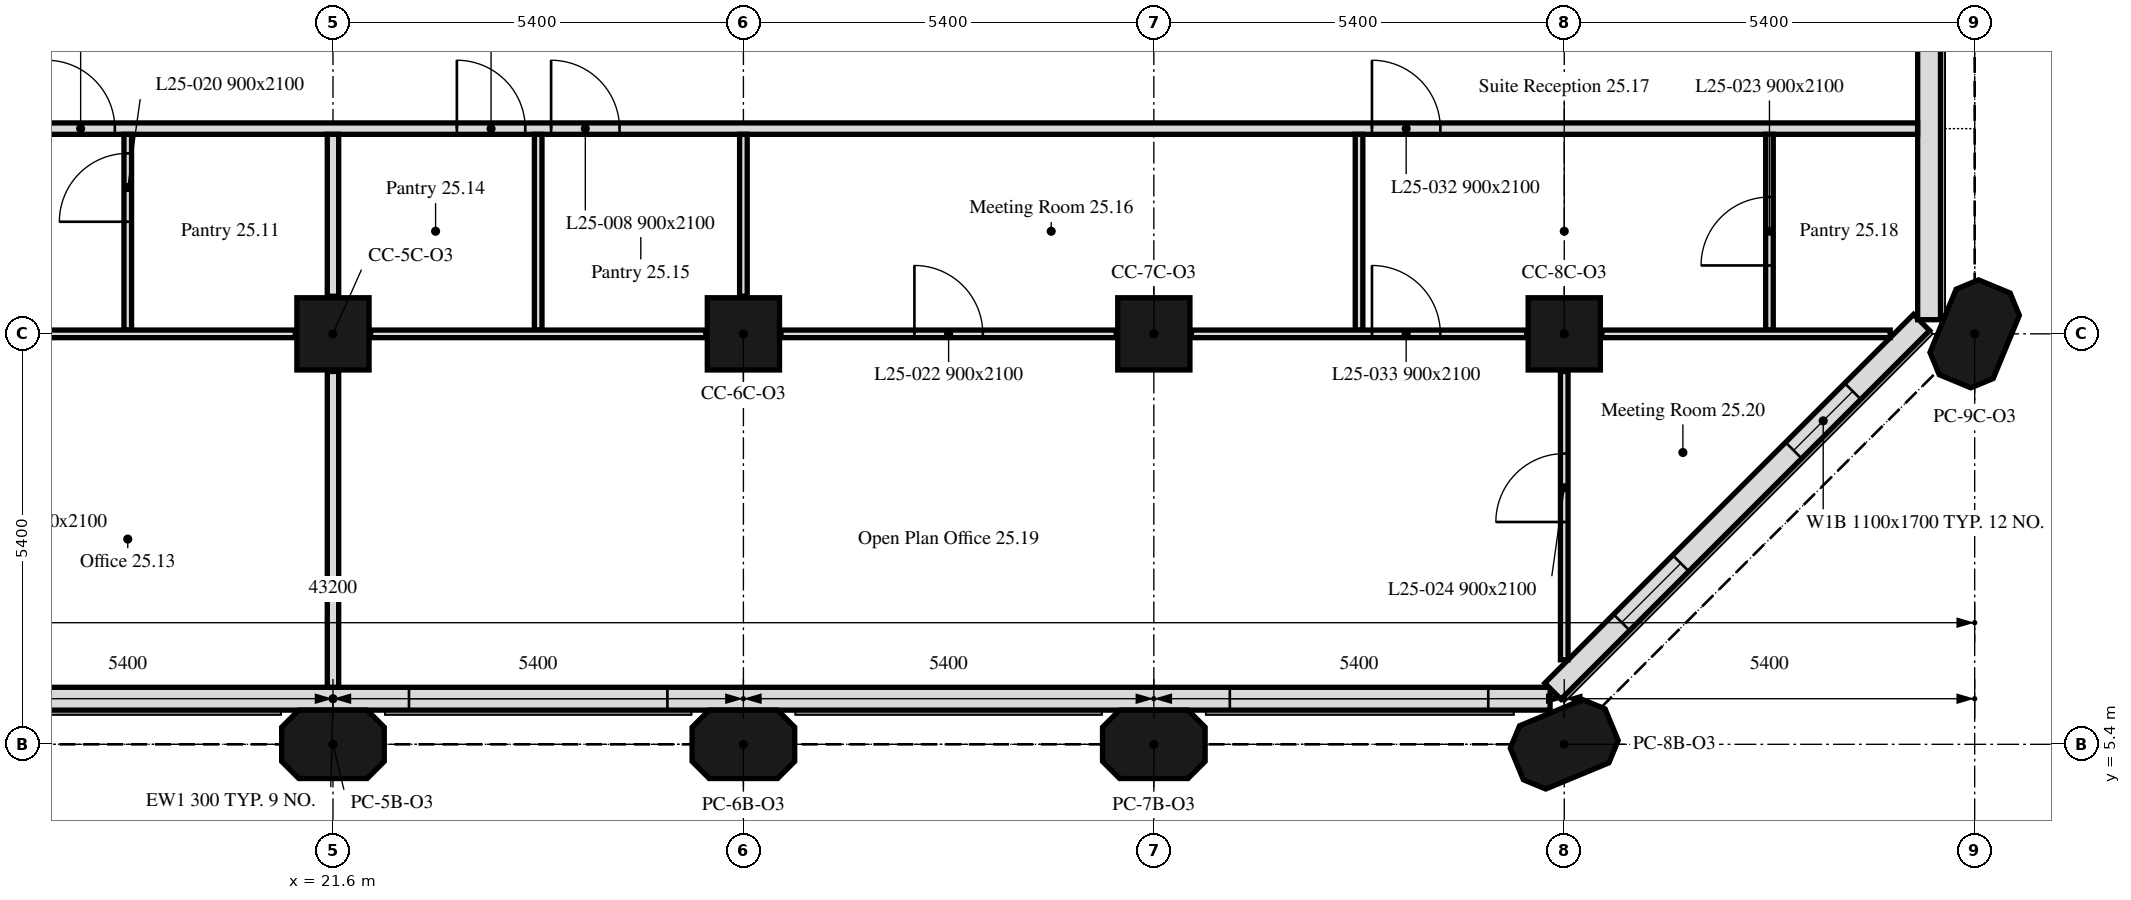
"""IFC4 building model, lengths in metres.
Left out: names, types, materials, properties, quantities, classifications, styles, units other than length and angle.
Written with IfcOpenShell. Run it as: python <this file> out.ifc"""

import sys

from ifc_helpers import new_model, si_unit, direction, frame, frame_2d, origin, origin_2d, place, context, subcontext, project, spatial, polyline, rectangle, outline, extrude, element, fill, save


model = new_model("IFC4")
c1 = context("Model", 3, precision=1e-05, world=origin(), true_north=direction((0.0, 1.0)))
c2 = subcontext(c1, "Body", "Model", "MODEL_VIEW")
j1 = project(units=[si_unit("LENGTHUNIT", "METRE"), si_unit("PLANEANGLEUNIT", "RADIAN")], contexts=[c1])
p1 = place(None, origin())
s1 = spatial("IfcSite", under=j1, at=p1, CompositionType="ELEMENT")
p2 = place(p1, origin())
s2 = spatial("IfcBuilding", under=s1, at=p2, CompositionType="ELEMENT")
p3 = place(p2, frame((0.0, 0.0, 106.8)))
s3 = spatial("IfcBuildingStorey", under=s2, at=p3, CompositionType="ELEMENT", Elevation=106.8)
for number, where, z_axis, x_axis in (
    (1, (21.6, 5.4, 0.0), (0.0, 0.0, 1.0), (1.0, 0.0, 0.0)),
    (2, (27.0, 5.4, 0.0), (0.0, 0.0, 1.0), (1.0, 0.0, 0.0)),
    (3, (32.4, 5.4, 0.0), (0.0, 0.0, 1.0), (1.0, 0.0, 0.0)),
    (4, (37.8, 5.4, 0.0), (0.0, 0.0, 1.0), (0.924, 0.383, 0.0)),
):
    element("IfcColumn", number, at=place(p3, frame(where, z_axis=z_axis, x_axis=x_axis)), inside=s3, PredefinedType="COLUMN", context=c2, shape_type="SweptSolid", body=[
        extrude(outline(polyline([(-0.45, -0.45), (0.45, -0.45), (0.675, -0.225), (0.675, 0.225), (0.45, 0.45), (-0.45, 0.45), (-0.675, 0.225), (-0.675, -0.225), (-0.45, -0.45)])), origin(), (0.0, 0.0, 1.0), 3.5),
    ])
for number, where, z_axis, x_axis in (
    (5, (21.6, 10.8, 0.0), (0.0, 0.0, 1.0), (1.0, 0.0, 0.0)),
    (6, (27.0, 10.8, 0.0), (0.0, 0.0, 1.0), (1.0, 0.0, 0.0)),
    (7, (32.4, 10.8, 0.0), (0.0, 0.0, 1.0), (1.0, 0.0, 0.0)),
    (8, (37.8, 10.8, 0.0), (0.0, 0.0, 1.0), (1.0, 0.0, 0.0)),
):
    element("IfcColumn", number, at=place(p3, frame(where, z_axis=z_axis, x_axis=x_axis)), inside=s3, PredefinedType="COLUMN", context=c2, shape_type="SweptSolid", body=[
        extrude(rectangle(XDim=0.95, YDim=0.95, at=origin_2d()), origin(), (0.0, 0.0, 1.0), 3.5),
    ])
p4 = place(p3, frame((43.2, 10.8, 0.0), z_axis=(0.0, 0.0, 1.0), x_axis=(0.382683432365, 0.923879532511, 0.0)))
e9 = element("IfcColumn", 9, at=p4, inside=s3, PredefinedType="COLUMN", context=c2, shape_type="SweptSolid", body=[
    extrude(outline(polyline([(-0.45, -0.45), (0.45, -0.45), (0.675, -0.225), (0.675, 0.225), (0.45, 0.45), (-0.45, 0.45), (-0.675, 0.225), (-0.675, -0.225), (-0.45, -0.45)])), origin(), (0.0, 0.0, 1.0), 3.5),
])
p5 = place(p3, frame((5.586, 6.0, 0.0), z_axis=(0.0, 0.0, 1.0), x_axis=(1.0, 0.0, 0.0)))
e10 = element("IfcWall", 10, at=p5, inside=s3, PredefinedType="SOLIDWALL", context=c2, shape_type="SweptSolid", body=[
    extrude(rectangle(XDim=32.027, YDim=0.3, at=frame_2d((16.014, 0.0))), origin(), (0.0, 0.0, 1.0), 3.5),
])
p6 = place(p5, frame((6.214, 0.0, 0.9)))
e11 = element("IfcOpeningElement", 11, at=p6, cuts=e10, PredefinedType="OPENING", context=c2, shape_type="SweptSolid", body=[
    extrude(rectangle(XDim=3.4, YDim=1.7, at=frame_2d((1.7, 0.85))), frame((0.0, 0.16, 0.0), z_axis=(0.0, -1.0, 0.0), x_axis=(1.0, 0.0, 0.0)), (0.0, 0.0, 1.0), 0.32),
])
p7 = place(p5, frame((17.014, 0.0, 0.9)))
e12 = element("IfcOpeningElement", 12, at=p7, cuts=e10, PredefinedType="OPENING", context=c2, shape_type="SweptSolid", body=[
    extrude(rectangle(XDim=3.4, YDim=1.7, at=frame_2d((1.7, 0.85))), frame((0.0, 0.16, 0.0), z_axis=(0.0, -1.0, 0.0), x_axis=(1.0, 0.0, 0.0)), (0.0, 0.0, 1.0), 0.32),
])
p8 = place(p5, frame((27.814, 0.0, 0.9)))
e13 = element("IfcOpeningElement", 13, at=p8, cuts=e10, PredefinedType="OPENING", context=c2, shape_type="SweptSolid", body=[
    extrude(rectangle(XDim=3.4, YDim=1.7, at=frame_2d((1.7, 0.85))), frame((0.0, 0.16, 0.0), z_axis=(0.0, -1.0, 0.0), x_axis=(1.0, 0.0, 0.0)), (0.0, 0.0, 1.0), 0.32),
])
p9 = place(p3, frame((37.65, 6.099, 0.0), z_axis=(0.0, 0.0, 1.0), x_axis=(0.707106781187, 0.707106781187, 0.0)))
e14 = element("IfcWall", 14, at=p9, inside=s3, PredefinedType="SOLIDWALL", context=c2, shape_type="SweptSolid", body=[
    extrude(rectangle(XDim=6.86, YDim=0.3, at=frame_2d((3.43, 0.0))), origin(), (0.0, 0.0, 1.0), 3.5),
])
p10 = place(p9, frame((1.28, 0.0, 0.9)))
e15 = element("IfcOpeningElement", 15, at=p10, cuts=e14, PredefinedType="OPENING", context=c2, shape_type="SweptSolid", body=[
    extrude(rectangle(XDim=1.1, YDim=1.7, at=frame_2d((0.55, 0.85))), frame((0.0, 0.16, 0.0), z_axis=(0.0, -1.0, 0.0), x_axis=(1.0, 0.0, 0.0)), (0.0, 0.0, 1.0), 0.32),
])
p11 = place(p9, frame((4.48, 0.0, 0.9)))
e16 = element("IfcOpeningElement", 16, at=p11, cuts=e14, PredefinedType="OPENING", context=c2, shape_type="SweptSolid", body=[
    extrude(rectangle(XDim=1.1, YDim=1.7, at=frame_2d((0.55, 0.85))), frame((0.0, 0.16, 0.0), z_axis=(0.0, -1.0, 0.0), x_axis=(1.0, 0.0, 0.0)), (0.0, 0.0, 1.0), 0.32),
])
p12 = place(p3, frame((42.6, 10.986, 0.0), z_axis=(0.0, 0.0, 1.0), x_axis=(0.0, 1.0, 0.0)))
e17 = element("IfcWall", 17, at=p12, inside=s3, PredefinedType="SOLIDWALL", context=c2, shape_type="SweptSolid", body=[
    extrude(rectangle(XDim=5.214, YDim=0.3, at=frame_2d((2.607, 0.0))), origin(), (0.0, 0.0, 1.0), 3.5),
])
p13 = place(p3, frame((0.751, 13.5, 0.0), z_axis=(0.0, 0.0, 1.0), x_axis=(1.0, 0.0, 0.0)))
e18 = element("IfcWall", 18, at=p13, inside=s3, PredefinedType="PARTITIONING", context=c2, shape_type="SweptSolid", body=[
    extrude(rectangle(XDim=41.698, YDim=0.15, at=frame_2d((20.849, 0.0))), origin(), (0.0, 0.0, 1.0), 3.5),
])
p14 = place(p13, frame((6.279, 0.0, 0.0)))
e19 = element("IfcOpeningElement", 19, at=p14, cuts=e18, PredefinedType="OPENING", context=c2, shape_type="SweptSolid", body=[
    extrude(rectangle(XDim=0.9, YDim=2.1, at=frame_2d((0.45, 1.05))), frame((0.0, 0.075, 0.0), z_axis=(0.0, -1.0, 0.0), x_axis=(1.0, 0.0, 0.0)), (0.0, 0.0, 1.0), 0.15),
])
p15 = place(p13, frame((7.519, 0.0, 0.0)))
e20 = element("IfcOpeningElement", 20, at=p15, cuts=e18, PredefinedType="OPENING", context=c2, shape_type="SweptSolid", body=[
    extrude(rectangle(XDim=0.9, YDim=2.1, at=frame_2d((0.45, 1.05))), frame((0.0, 0.075, 0.0), z_axis=(0.0, -1.0, 0.0), x_axis=(1.0, 0.0, 0.0)), (0.0, 0.0, 1.0), 0.15),
])
p16 = place(p13, frame((11.679, 0.0, 0.0)))
e21 = element("IfcOpeningElement", 21, at=p16, cuts=e18, PredefinedType="OPENING", context=c2, shape_type="SweptSolid", body=[
    extrude(rectangle(XDim=0.9, YDim=2.1, at=frame_2d((0.45, 1.05))), frame((0.0, 0.075, 0.0), z_axis=(0.0, -1.0, 0.0), x_axis=(1.0, 0.0, 0.0)), (0.0, 0.0, 1.0), 0.15),
])
p17 = place(p13, frame((22.479, 0.0, 0.0)))
e22 = element("IfcOpeningElement", 22, at=p17, cuts=e18, PredefinedType="OPENING", context=c2, shape_type="SweptSolid", body=[
    extrude(rectangle(XDim=0.9, YDim=2.1, at=frame_2d((0.45, 1.05))), frame((0.0, 0.075, 0.0), z_axis=(0.0, -1.0, 0.0), x_axis=(1.0, 0.0, 0.0)), (0.0, 0.0, 1.0), 0.15),
])
p18 = place(p13, frame((23.719, 0.0, 0.0)))
e23 = element("IfcOpeningElement", 23, at=p18, cuts=e18, PredefinedType="OPENING", context=c2, shape_type="SweptSolid", body=[
    extrude(rectangle(XDim=0.9, YDim=2.1, at=frame_2d((0.45, 1.05))), frame((0.0, 0.075, 0.0), z_axis=(0.0, -1.0, 0.0), x_axis=(1.0, 0.0, 0.0)), (0.0, 0.0, 1.0), 0.15),
])
p19 = place(p13, frame((2.174, 0.0, 0.0)))
e24 = element("IfcOpeningElement", 24, at=p19, cuts=e18, PredefinedType="OPENING", context=c2, shape_type="SweptSolid", body=[
    extrude(rectangle(XDim=0.9, YDim=2.1, at=frame_2d((0.45, 1.05))), frame((0.0, 0.075, 0.0), z_axis=(0.0, -1.0, 0.0), x_axis=(1.0, 0.0, 0.0)), (0.0, 0.0, 1.0), 0.15),
])
p20 = place(p13, frame((17.079, 0.0, 0.0)))
e25 = element("IfcOpeningElement", 25, at=p20, cuts=e18, PredefinedType="OPENING", context=c2, shape_type="SweptSolid", body=[
    extrude(rectangle(XDim=0.9, YDim=2.1, at=frame_2d((0.45, 1.05))), frame((0.0, 0.075, 0.0), z_axis=(0.0, -1.0, 0.0), x_axis=(1.0, 0.0, 0.0)), (0.0, 0.0, 1.0), 0.15),
])
p21 = place(p13, frame((34.519, 0.0, 0.0)))
e26 = element("IfcOpeningElement", 26, at=p21, cuts=e18, PredefinedType="OPENING", context=c2, shape_type="SweptSolid", body=[
    extrude(rectangle(XDim=0.9, YDim=2.1, at=frame_2d((0.45, 1.05))), frame((0.0, 0.075, 0.0), z_axis=(0.0, -1.0, 0.0), x_axis=(1.0, 0.0, 0.0)), (0.0, 0.0, 1.0), 0.15),
])
p22 = place(p3, frame((18.9, 10.85, 0.0), z_axis=(0.0, 0.0, 1.0), x_axis=(0.0, 1.0, 0.0)))
e27 = element("IfcWall", 27, at=p22, inside=s3, PredefinedType="PARTITIONING", context=c2, shape_type="SweptSolid", body=[
    extrude(rectangle(XDim=2.575, YDim=0.1, at=frame_2d((1.288, 0.0))), origin(), (0.0, 0.0, 1.0), 3.5),
])
p23 = place(p22, frame((1.425, 0.0, 0.0)))
e28 = element("IfcOpeningElement", 28, at=p23, cuts=e27, PredefinedType="OPENING", context=c2, shape_type="SweptSolid", body=[
    extrude(rectangle(XDim=0.9, YDim=2.1, at=frame_2d((0.45, 1.05))), frame((0.0, 0.05, 0.0), z_axis=(0.0, -1.0, 0.0), x_axis=(1.0, 0.0, 0.0)), (0.0, 0.0, 1.0), 0.1),
])
p24 = place(p3, frame((16.695, 10.8, 0.0), z_axis=(0.0, 0.0, 1.0), x_axis=(1.0, 0.0, 0.0)))
e29 = element("IfcWall", 29, at=p24, inside=s3, PredefinedType="PARTITIONING", context=c2, shape_type="SweptSolid", body=[
    extrude(rectangle(XDim=4.41, YDim=0.1, at=frame_2d((2.205, 0.0))), origin(), (0.0, 0.0, 1.0), 3.5),
])
p25 = place(p3, frame((21.6, 11.295, 0.0), z_axis=(0.0, 0.0, 1.0), x_axis=(0.0, 1.0, 0.0)))
e30 = element("IfcWall", 30, at=p25, inside=s3, PredefinedType="PARTITIONING", context=c2, shape_type="SweptSolid", body=[
    extrude(rectangle(XDim=2.13, YDim=0.15, at=frame_2d((1.065, 0.0))), origin(), (0.0, 0.0, 1.0), 3.5),
])
p26 = place(p3, frame((21.6, 6.151, 0.0), z_axis=(0.0, 0.0, 1.0), x_axis=(0.0, 1.0, 0.0)))
e31 = element("IfcWall", 31, at=p26, inside=s3, PredefinedType="PARTITIONING", context=c2, shape_type="SweptSolid", body=[
    extrude(rectangle(XDim=4.154, YDim=0.15, at=frame_2d((2.077, 0.0))), origin(), (0.0, 0.0, 1.0), 3.5),
])
p27 = place(p3, frame((24.3, 10.85, 0.0), z_axis=(0.0, 0.0, 1.0), x_axis=(0.0, 1.0, 0.0)))
e32 = element("IfcWall", 32, at=p27, inside=s3, PredefinedType="PARTITIONING", context=c2, shape_type="SweptSolid", body=[
    extrude(rectangle(XDim=2.575, YDim=0.1, at=frame_2d((1.288, 0.0))), origin(), (0.0, 0.0, 1.0), 3.5),
])
p28 = place(p3, frame((22.095, 10.8, 0.0), z_axis=(0.0, 0.0, 1.0), x_axis=(1.0, 0.0, 0.0)))
e33 = element("IfcWall", 33, at=p28, inside=s3, PredefinedType="PARTITIONING", context=c2, shape_type="SweptSolid", body=[
    extrude(rectangle(XDim=4.41, YDim=0.1, at=frame_2d((2.205, 0.0))), origin(), (0.0, 0.0, 1.0), 3.5),
])
p29 = place(p3, frame((27.0, 11.295, 0.0), z_axis=(0.0, 0.0, 1.0), x_axis=(0.0, 1.0, 0.0)))
e34 = element("IfcWall", 34, at=p29, inside=s3, PredefinedType="PARTITIONING", context=c2, shape_type="SweptSolid", body=[
    extrude(rectangle(XDim=2.13, YDim=0.1, at=frame_2d((1.065, 0.0))), origin(), (0.0, 0.0, 1.0), 3.5),
])
p30 = place(p3, frame((27.495, 10.8, 0.0), z_axis=(0.0, 0.0, 1.0), x_axis=(1.0, 0.0, 0.0)))
e35 = element("IfcWall", 35, at=p30, inside=s3, PredefinedType="PARTITIONING", context=c2, shape_type="SweptSolid", body=[
    extrude(rectangle(XDim=4.41, YDim=0.1, at=frame_2d((2.205, 0.0))), origin(), (0.0, 0.0, 1.0), 3.5),
])
p31 = place(p30, frame((1.755, 0.0, 0.0)))
e36 = element("IfcOpeningElement", 36, at=p31, cuts=e35, PredefinedType="OPENING", context=c2, shape_type="SweptSolid", body=[
    extrude(rectangle(XDim=0.9, YDim=2.1, at=frame_2d((0.45, 1.05))), frame((0.0, 0.05, 0.0), z_axis=(0.0, -1.0, 0.0), x_axis=(1.0, 0.0, 0.0)), (0.0, 0.0, 1.0), 0.1),
])
p32 = place(p3, frame((35.1, 10.85, 0.0), z_axis=(0.0, 0.0, 1.0), x_axis=(0.0, 1.0, 0.0)))
e37 = element("IfcWall", 37, at=p32, inside=s3, PredefinedType="PARTITIONING", context=c2, shape_type="SweptSolid", body=[
    extrude(rectangle(XDim=2.575, YDim=0.1, at=frame_2d((1.288, 0.0))), origin(), (0.0, 0.0, 1.0), 3.5),
])
p33 = place(p3, frame((32.895, 10.8, 0.0), z_axis=(0.0, 0.0, 1.0), x_axis=(1.0, 0.0, 0.0)))
e38 = element("IfcWall", 38, at=p33, inside=s3, PredefinedType="PARTITIONING", context=c2, shape_type="SweptSolid", body=[
    extrude(rectangle(XDim=4.41, YDim=0.1, at=frame_2d((2.205, 0.0))), origin(), (0.0, 0.0, 1.0), 3.5),
])
p34 = place(p33, frame((2.375, 0.0, 0.0)))
e39 = element("IfcOpeningElement", 39, at=p34, cuts=e38, PredefinedType="OPENING", context=c2, shape_type="SweptSolid", body=[
    extrude(rectangle(XDim=0.9, YDim=2.1, at=frame_2d((0.45, 1.05))), frame((0.0, 0.05, 0.0), z_axis=(0.0, -1.0, 0.0), x_axis=(1.0, 0.0, 0.0)), (0.0, 0.0, 1.0), 0.1),
])
p35 = place(p3, frame((40.5, 10.85, 0.0), z_axis=(0.0, 0.0, 1.0), x_axis=(0.0, 1.0, 0.0)))
e40 = element("IfcWall", 40, at=p35, inside=s3, PredefinedType="PARTITIONING", context=c2, shape_type="SweptSolid", body=[
    extrude(rectangle(XDim=2.575, YDim=0.1, at=frame_2d((1.288, 0.0))), origin(), (0.0, 0.0, 1.0), 3.5),
])
p36 = place(p35, frame((0.85, 0.0, 0.0)))
e41 = element("IfcOpeningElement", 41, at=p36, cuts=e40, PredefinedType="OPENING", context=c2, shape_type="SweptSolid", body=[
    extrude(rectangle(XDim=0.9, YDim=2.1, at=frame_2d((0.45, 1.05))), frame((0.0, 0.05, 0.0), z_axis=(0.0, -1.0, 0.0), x_axis=(1.0, 0.0, 0.0)), (0.0, 0.0, 1.0), 0.1),
])
p37 = place(p3, frame((38.295, 10.8, 0.0), z_axis=(0.0, 0.0, 1.0), x_axis=(1.0, 0.0, 0.0)))
e42 = element("IfcWall", 42, at=p37, inside=s3, PredefinedType="PARTITIONING", context=c2, shape_type="SweptSolid", body=[
    extrude(rectangle(XDim=3.793, YDim=0.1, at=frame_2d((1.896, 0.0))), origin(), (0.0, 0.0, 1.0), 3.5),
])
p38 = place(p3, frame((37.8, 6.512, 0.0), z_axis=(0.0, 0.0, 1.0), x_axis=(0.0, 1.0, 0.0)))
e43 = element("IfcWall", 43, at=p38, inside=s3, PredefinedType="PARTITIONING", context=c2, shape_type="SweptSolid", body=[
    extrude(rectangle(XDim=3.793, YDim=0.1, at=frame_2d((1.896, 0.0))), origin(), (0.0, 0.0, 1.0), 3.5),
])
p39 = place(p38, frame((1.813, 0.0, 0.0)))
e44 = element("IfcOpeningElement", 44, at=p39, cuts=e43, PredefinedType="OPENING", context=c2, shape_type="SweptSolid", body=[
    extrude(rectangle(XDim=0.9, YDim=2.1, at=frame_2d((0.45, 1.05))), frame((0.0, 0.05, 0.0), z_axis=(0.0, -1.0, 0.0), x_axis=(1.0, 0.0, 0.0)), (0.0, 0.0, 1.0), 0.1),
])
p40 = place(p7, origin())
e45 = element("IfcWindow", 45, at=p40, inside=s3, PartitioningType="SINGLE_PANEL", PredefinedType="WINDOW", context=c2, shape_type="SweptSolid", body=[
    extrude(rectangle(XDim=3.4, YDim=1.7, at=frame_2d((1.7, 0.85))), frame((0.0, 0.03, 0.0), z_axis=(0.0, -1.0, 0.0), x_axis=(1.0, 0.0, 0.0)), (0.0, 0.0, 1.0), 0.06),
])
fill(e12, e45)
p41 = place(p8, origin())
e46 = element("IfcWindow", 46, at=p41, inside=s3, PartitioningType="SINGLE_PANEL", PredefinedType="WINDOW", context=c2, shape_type="SweptSolid", body=[
    extrude(rectangle(XDim=3.4, YDim=1.7, at=frame_2d((1.7, 0.85))), frame((0.0, 0.03, 0.0), z_axis=(0.0, -1.0, 0.0), x_axis=(1.0, 0.0, 0.0)), (0.0, 0.0, 1.0), 0.06),
])
fill(e13, e46)
p42 = place(p10, origin())
e47 = element("IfcWindow", 47, at=p42, inside=s3, PartitioningType="SINGLE_PANEL", PredefinedType="WINDOW", context=c2, shape_type="SweptSolid", body=[
    extrude(rectangle(XDim=1.1, YDim=1.7, at=frame_2d((0.55, 0.85))), frame((0.0, 0.03, 0.0), z_axis=(0.0, -1.0, 0.0), x_axis=(1.0, 0.0, 0.0)), (0.0, 0.0, 1.0), 0.06),
])
fill(e15, e47)
p43 = place(p11, origin())
e48 = element("IfcWindow", 48, at=p43, inside=s3, PartitioningType="SINGLE_PANEL", PredefinedType="WINDOW", context=c2, shape_type="SweptSolid", body=[
    extrude(rectangle(XDim=1.1, YDim=1.7, at=frame_2d((0.55, 0.85))), frame((0.0, 0.03, 0.0), z_axis=(0.0, -1.0, 0.0), x_axis=(1.0, 0.0, 0.0)), (0.0, 0.0, 1.0), 0.06),
])
fill(e16, e48)
p44 = place(p17, origin())
e49 = element("IfcDoor", 49, at=p44, inside=s3, OperationType="SINGLE_SWING_LEFT", PredefinedType="DOOR", context=c2, shape_type="SweptSolid", body=[
    extrude(rectangle(XDim=0.9, YDim=2.1, at=frame_2d((0.45, 1.05))), frame((0.0, 0.025, 0.0), z_axis=(0.0, -1.0, 0.0), x_axis=(1.0, 0.0, 0.0)), (0.0, 0.0, 1.0), 0.05),
])
fill(e22, e49)
p45 = place(p18, origin())
e50 = element("IfcDoor", 50, at=p45, inside=s3, OperationType="SINGLE_SWING_LEFT", PredefinedType="DOOR", context=c2, shape_type="SweptSolid", body=[
    extrude(rectangle(XDim=0.9, YDim=2.1, at=frame_2d((0.45, 1.05))), frame((0.0, 0.025, 0.0), z_axis=(0.0, -1.0, 0.0), x_axis=(1.0, 0.0, 0.0)), (0.0, 0.0, 1.0), 0.05),
])
fill(e23, e50)
p46 = place(p23, origin())
e51 = element("IfcDoor", 51, at=p46, inside=s3, OperationType="SINGLE_SWING_RIGHT", PredefinedType="DOOR", context=c2, shape_type="SweptSolid", body=[
    extrude(rectangle(XDim=0.9, YDim=2.1, at=frame_2d((0.45, 1.05))), frame((0.0, 0.025, 0.0), z_axis=(0.0, -1.0, 0.0), x_axis=(1.0, 0.0, 0.0)), (0.0, 0.0, 1.0), 0.05),
])
fill(e28, e51)
p47 = place(p31, origin())
e52 = element("IfcDoor", 52, at=p47, inside=s3, OperationType="SINGLE_SWING_RIGHT", PredefinedType="DOOR", context=c2, shape_type="SweptSolid", body=[
    extrude(rectangle(XDim=0.9, YDim=2.1, at=frame_2d((0.45, 1.05))), frame((0.0, 0.025, 0.0), z_axis=(0.0, -1.0, 0.0), x_axis=(1.0, 0.0, 0.0)), (0.0, 0.0, 1.0), 0.05),
])
fill(e36, e52)
p48 = place(p36, origin())
e53 = element("IfcDoor", 53, at=p48, inside=s3, OperationType="SINGLE_SWING_LEFT", PredefinedType="DOOR", context=c2, shape_type="SweptSolid", body=[
    extrude(rectangle(XDim=0.9, YDim=2.1, at=frame_2d((0.45, 1.05))), frame((0.0, 0.025, 0.0), z_axis=(0.0, -1.0, 0.0), x_axis=(1.0, 0.0, 0.0)), (0.0, 0.0, 1.0), 0.05),
])
fill(e41, e53)
p49 = place(p39, origin())
e54 = element("IfcDoor", 54, at=p49, inside=s3, OperationType="SINGLE_SWING_LEFT", PredefinedType="DOOR", context=c2, shape_type="SweptSolid", body=[
    extrude(rectangle(XDim=0.9, YDim=2.1, at=frame_2d((0.45, 1.05))), frame((0.0, 0.025, 0.0), z_axis=(0.0, -1.0, 0.0), x_axis=(1.0, 0.0, 0.0)), (0.0, 0.0, 1.0), 0.05),
])
fill(e44, e54)
p50 = place(p20, origin())
e55 = element("IfcDoor", 55, at=p50, inside=s3, OperationType="SINGLE_SWING_LEFT", PredefinedType="DOOR", context=c2, shape_type="SweptSolid", body=[
    extrude(rectangle(XDim=0.9, YDim=2.1, at=frame_2d((0.45, 1.05))), frame((0.0, 0.025, 0.0), z_axis=(0.0, -1.0, 0.0), x_axis=(1.0, 0.0, 0.0)), (0.0, 0.0, 1.0), 0.05),
])
fill(e25, e55)
p51 = place(p21, origin())
e56 = element("IfcDoor", 56, at=p51, inside=s3, OperationType="SINGLE_SWING_LEFT", PredefinedType="DOOR", context=c2, shape_type="SweptSolid", body=[
    extrude(rectangle(XDim=0.9, YDim=2.1, at=frame_2d((0.45, 1.05))), frame((0.0, 0.025, 0.0), z_axis=(0.0, -1.0, 0.0), x_axis=(1.0, 0.0, 0.0)), (0.0, 0.0, 1.0), 0.05),
])
fill(e26, e56)
p52 = place(p34, origin())
e57 = element("IfcDoor", 57, at=p52, inside=s3, OperationType="SINGLE_SWING_LEFT", PredefinedType="DOOR", context=c2, shape_type="SweptSolid", body=[
    extrude(rectangle(XDim=0.9, YDim=2.1, at=frame_2d((0.45, 1.05))), frame((0.0, 0.025, 0.0), z_axis=(0.0, -1.0, 0.0), x_axis=(1.0, 0.0, 0.0)), (0.0, 0.0, 1.0), 0.05),
])
fill(e39, e57)
save(model, sys.argv[1])
